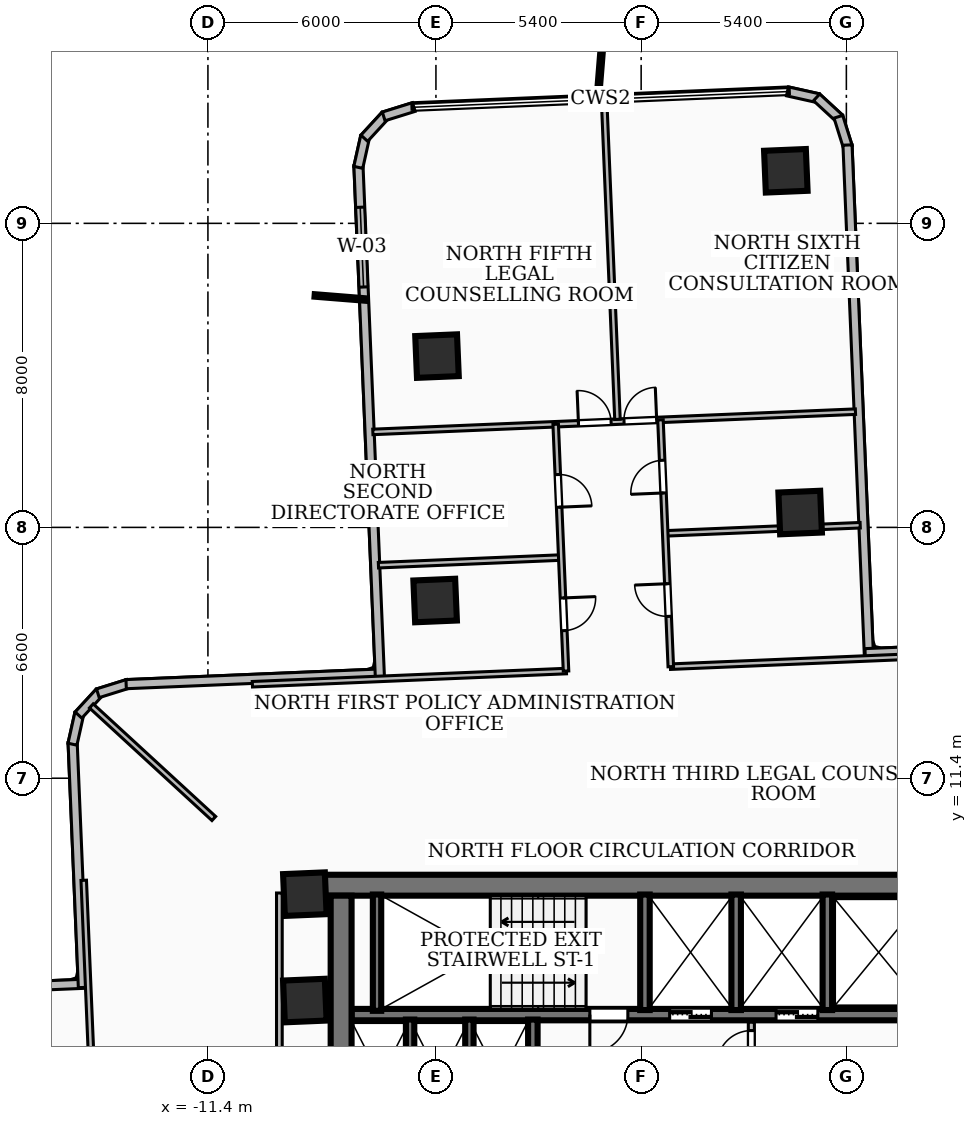
"""IFC4 building model, lengths in metres.
Left out: names, types, materials, properties, quantities, classifications, styles, units other than length and angle.
Written with IfcOpenShell. Run it as: python <this file> out.ifc"""

import sys

from ifc_helpers import new_model, si_unit, direction, frame, frame_2d, origin, origin_2d, place, context, subcontext, project, spatial, rectangle, extrude, element, fill, save


model = new_model("IFC4")
c1 = context("Model", 3, precision=1e-05, world=origin(), true_north=direction((0.0, 1.0)))
c2 = subcontext(c1, "Body", "Model", "MODEL_VIEW")
j1 = project(units=[si_unit("LENGTHUNIT", "METRE"), si_unit("PLANEANGLEUNIT", "RADIAN")], contexts=[c1])
p1 = place(None, origin())
s1 = spatial("IfcSite", under=j1, at=p1, CompositionType="ELEMENT")
p2 = place(p1, origin())
s2 = spatial("IfcBuilding", under=s1, at=p2, CompositionType="ELEMENT")
p3 = place(p2, frame((0.0, 0.0, 46.08)))
s3 = spatial("IfcBuildingStorey", under=s2, at=p3, CompositionType="ELEMENT", Elevation=46.08)
p4 = place(p3, frame((-8.78, 8.585, 0.0), z_axis=(0.0, 0.0, 1.0), x_axis=(1.0, 0.0, 0.0)))
e1 = element("IfcWall", 1, at=p4, inside=s3, PredefinedType="SHEAR", context=c2, shape_type="SweptSolid", body=[
    extrude(rectangle(XDim=17.56, YDim=0.55, at=frame_2d((8.78, 0.0))), origin(), (0.0, 0.0, 1.0), 3.32),
])
p5 = place(p3, frame((-7.895, 2.025, 0.0), z_axis=(0.0, 0.0, 1.0), x_axis=(0.0, 1.0, 0.0)))
e2 = element("IfcWall", 2, at=p5, inside=s3, PredefinedType="SHEAR", context=c2, shape_type="SweptSolid", body=[
    extrude(rectangle(XDim=6.285, YDim=0.55, at=frame_2d((3.143, 0.0))), origin(), (0.0, 0.0, 1.0), 3.32),
])
p6 = place(p3, frame((7.62, 5.18, 0.0), z_axis=(0.0, 0.0, 1.0), x_axis=(-1.0, 0.0, 0.0)))
e3 = element("IfcWall", 3, at=p6, inside=s3, PredefinedType="SOLIDWALL", context=c2, shape_type="SweptSolid", body=[
    extrude(rectangle(XDim=15.24, YDim=0.3, at=frame_2d((7.62, 0.0))), origin(), (0.0, 0.0, 1.0), 3.32),
])
p7 = place(p6, frame((5.77, 0.0, 0.0)))
e4 = element("IfcOpeningElement", 4, at=p7, cuts=e3, PredefinedType="OPENING", context=c2, shape_type="SweptSolid", body=[
    extrude(rectangle(XDim=1.1, YDim=2.15, at=frame_2d((0.55, 1.075))), frame((0.0, 0.16, 0.0), z_axis=(0.0, -1.0, 0.0), x_axis=(1.0, 0.0, 0.0)), (0.0, 0.0, 1.0), 0.32),
])
p8 = place(p6, frame((2.97, 0.0, 0.0)))
e5 = element("IfcOpeningElement", 5, at=p8, cuts=e3, PredefinedType="OPENING", context=c2, shape_type="SweptSolid", body=[
    extrude(rectangle(XDim=1.1, YDim=2.15, at=frame_2d((0.55, 1.075))), frame((0.0, 0.16, 0.0), z_axis=(0.0, -1.0, 0.0), x_axis=(1.0, 0.0, 0.0)), (0.0, 0.0, 1.0), 0.32),
])
p9 = place(p6, frame((7.97, 0.0, 0.0)))
e6 = element("IfcOpeningElement", 6, at=p9, cuts=e3, PredefinedType="OPENING", context=c2, shape_type="SweptSolid", body=[
    extrude(rectangle(XDim=1.0, YDim=2.1, at=frame_2d((0.5, 1.05))), frame((0.0, 0.16, 0.0), z_axis=(0.0, -1.0, 0.0), x_axis=(1.0, 0.0, 0.0)), (0.0, 0.0, 1.0), 0.32),
])
p10 = place(p3, frame((-6.95, 5.28, 0.0), z_axis=(0.0, 0.0, 1.0), x_axis=(0.0, 1.0, 0.0)))
e7 = element("IfcWall", 7, at=p10, inside=s3, PredefinedType="SOLIDWALL", context=c2, shape_type="SweptSolid", body=[
    extrude(rectangle(XDim=3.06, YDim=0.22, at=frame_2d((1.53, 0.0))), origin(), (0.0, 0.0, 1.0), 3.32),
])
for number, where, z_axis, x_axis in (
    (8, (0.1, 5.3, 0.0), (0.0, 0.0, 1.0), (0.0, 1.0, 0.0)),
    (9, (2.5, 5.3, 0.0), (0.0, 0.0, 1.0), (0.0, 1.0, 0.0)),
    (10, (4.9, 5.3, 0.0), (0.0, 0.0, 1.0), (0.0, 1.0, 0.0)),
):
    element("IfcWall", number, at=place(p3, frame(where, z_axis=z_axis, x_axis=x_axis)), inside=s3, PredefinedType="SOLIDWALL", context=c2, shape_type="SweptSolid", body=[
        extrude(rectangle(XDim=3.04, YDim=0.25, at=frame_2d((1.52, 0.0))), origin(), (0.0, 0.0, 1.0), 3.32),
    ])
p11 = place(p3, frame((-2.85, 1.98, 0.0), z_axis=(0.0, 0.0, 1.0), x_axis=(0.0, 1.0, 0.0)))
e11 = element("IfcWall", 11, at=p11, inside=s3, PredefinedType="SOLIDWALL", context=c2, shape_type="SweptSolid", body=[
    extrude(rectangle(XDim=3.07, YDim=0.25, at=frame_2d((1.535, 0.0))), origin(), (0.0, 0.0, 1.0), 3.32),
])
for number, where, z_axis, x_axis in (
    (12, (-6.08, 1.98, 0.0), (0.0, 0.0, 1.0), (0.0, 1.0, 0.0)),
    (13, (-4.52, 1.98, 0.0), (0.0, 0.0, 1.0), (0.0, 1.0, 0.0)),
):
    element("IfcWall", number, at=place(p3, frame(where, z_axis=z_axis, x_axis=x_axis)), inside=s3, PredefinedType="SOLIDWALL", context=c2, shape_type="SweptSolid", body=[
        extrude(rectangle(XDim=3.07, YDim=0.22, at=frame_2d((1.535, 0.0))), origin(), (0.0, 0.0, 1.0), 3.32),
    ])
for number, where, z_axis, x_axis in (
    (14, (-8.85, 5.55, 0.0), (0.0, 0.0, 1.0), (0.999, 0.042, 0.0)),
    (15, (-8.85, 8.35, 0.0), (0.0, 0.0, 1.0), (0.999, 0.042, 0.0)),
    (16, (4.184, 18.391, 0.0), (0.0, 0.0, 1.0), (0.999, 0.042, 0.0)),
    (17, (-5.421, 16.076, 0.0), (0.0, 0.0, 1.0), (0.999, 0.042, 0.0)),
    (18, (3.807, 27.383, 0.0), (0.0, 0.0, 1.0), (0.999, 0.042, 0.0)),
    (19, (-5.372, 22.507, 0.0), (0.0, 0.0, 1.0), (0.999, 0.042, 0.0)),
):
    element("IfcColumn", number, at=place(p3, frame(where, z_axis=z_axis, x_axis=x_axis)), inside=s3, PredefinedType="COLUMN", context=c2, shape_type="SweptSolid", body=[
        extrude(rectangle(XDim=1.1, YDim=1.1, at=origin_2d()), origin(), (0.0, 0.0, 1.0), 3.6),
    ])
p12 = place(p3, frame((-31.458, 5.287, 0.0), z_axis=(0.0, 0.0, 1.0), x_axis=(0.999122484842, 0.041883890494, 0.0)))
e20 = element("IfcWall", 20, at=p12, inside=s3, PredefinedType="SOLIDWALL", context=c2, shape_type="SweptSolid", body=[
    extrude(rectangle(XDim=16.875, YDim=0.24, at=frame_2d((8.438, 0.0))), origin(), (0.0, 0.0, 1.0), 3.32),
])
p13 = place(p12, frame((1.1, 0.0, 0.85)))
e21 = element("IfcOpeningElement", 21, at=p13, cuts=e20, PredefinedType="OPENING", context=c2, shape_type="SweptSolid", body=[
    extrude(rectangle(XDim=2.1, YDim=1.8, at=frame_2d((1.05, 0.9))), frame((0.0, 0.13, 0.0), z_axis=(0.0, -1.0, 0.0), x_axis=(1.0, 0.0, 0.0)), (0.0, 0.0, 1.0), 0.26),
])
p14 = place(p3, frame((-14.69, 5.894, 0.0), z_axis=(0.0, 0.0, 1.0), x_axis=(-0.041827173477, 0.999124860845, 0.0)))
e22 = element("IfcWall", 22, at=p14, inside=s3, PredefinedType="SOLIDWALL", context=c2, shape_type="SweptSolid", body=[
    extrude(rectangle(XDim=6.456, YDim=0.24, at=frame_2d((3.228, 0.0))), origin(), (0.0, 0.0, 1.0), 3.32),
])
p15 = place(p3, frame((-14.964, 12.295, 0.0), z_axis=(0.0, 0.0, 1.0), x_axis=(0.21736704137, 0.976089939158, 0.0)))
e23 = element("IfcWall", 23, at=p15, inside=s3, PredefinedType="SOLIDWALL", context=c2, shape_type="SweptSolid", body=[
    extrude(rectangle(XDim=0.829, YDim=0.24, at=frame_2d((0.415, 0.0))), origin(), (0.0, 0.0, 1.0), 3.32),
])
p16 = place(p3, frame((-14.806, 13.062, 0.0), z_axis=(0.0, 0.0, 1.0), x_axis=(0.677693750404, 0.735344259965, 0.0)))
e24 = element("IfcWall", 24, at=p16, inside=s3, PredefinedType="SOLIDWALL", context=c2, shape_type="SweptSolid", body=[
    extrude(rectangle(XDim=0.813, YDim=0.24, at=frame_2d((0.406, 0.0))), origin(), (0.0, 0.0, 1.0), 3.32),
])
p17 = place(p3, frame((-14.296, 13.635, 0.0), z_axis=(0.0, 0.0, 1.0), x_axis=(0.954396284631, 0.298542680168, 0.0)))
e25 = element("IfcWall", 25, at=p17, inside=s3, PredefinedType="SOLIDWALL", context=c2, shape_type="SweptSolid", body=[
    extrude(rectangle(XDim=0.831, YDim=0.24, at=frame_2d((0.416, 0.0))), origin(), (0.0, 0.0, 1.0), 3.32),
])
p18 = place(p3, frame((-13.552, 13.875, 0.0), z_axis=(0.0, 0.0, 1.0), x_axis=(0.999127443157, 0.041765444226, 0.0)))
e26 = element("IfcWall", 26, at=p18, inside=s3, PredefinedType="SOLIDWALL", context=c2, shape_type="SweptSolid", body=[
    extrude(rectangle(XDim=6.775, YDim=0.24, at=frame_2d((3.387, 0.0))), origin(), (0.0, 0.0, 1.0), 3.32),
])
p19 = place(p3, frame((-6.875, 14.058, 0.0), z_axis=(0.0, 0.0, 1.0), x_axis=(-0.041850586852, 0.999123880397, 0.0)))
e27 = element("IfcWall", 27, at=p19, inside=s3, PredefinedType="SOLIDWALL", context=c2, shape_type="SweptSolid", body=[
    extrude(rectangle(XDim=13.476, YDim=0.24, at=frame_2d((6.738, 0.0))), origin(), (0.0, 0.0, 1.0), 3.32),
])
p20 = place(p19, frame((10.276, 0.0, 0.85)))
e28 = element("IfcOpeningElement", 28, at=p20, cuts=e27, PredefinedType="OPENING", context=c2, shape_type="SweptSolid", body=[
    extrude(rectangle(XDim=2.1, YDim=2.0, at=frame_2d((1.05, 1.0))), frame((0.0, 0.13, 0.0), z_axis=(0.0, -1.0, 0.0), x_axis=(1.0, 0.0, 0.0)), (0.0, 0.0, 1.0), 0.26),
])
p21 = place(p3, frame((-7.443, 27.473, 0.0), z_axis=(0.0, 0.0, 1.0), x_axis=(0.21736704137, 0.976089939158, 0.0)))
e29 = element("IfcWall", 29, at=p21, inside=s3, PredefinedType="SOLIDWALL", context=c2, shape_type="SweptSolid", body=[
    extrude(rectangle(XDim=0.829, YDim=0.24, at=frame_2d((0.415, 0.0))), origin(), (0.0, 0.0, 1.0), 3.32),
])
p22 = place(p3, frame((-7.285, 28.24, 0.0), z_axis=(0.0, 0.0, 1.0), x_axis=(0.676946063044, 0.73603262681, 0.0)))
e30 = element("IfcWall", 30, at=p22, inside=s3, PredefinedType="SOLIDWALL", context=c2, shape_type="SweptSolid", body=[
    extrude(rectangle(XDim=0.814, YDim=0.24, at=frame_2d((0.407, 0.0))), origin(), (0.0, 0.0, 1.0), 3.32),
])
p23 = place(p3, frame((-6.775, 28.814, 0.0), z_axis=(0.0, 0.0, 1.0), x_axis=(0.954730695464, 0.297471509794, 0.0)))
e31 = element("IfcWall", 31, at=p23, inside=s3, PredefinedType="SOLIDWALL", context=c2, shape_type="SweptSolid", body=[
    extrude(rectangle(XDim=0.831, YDim=0.24, at=frame_2d((0.415, 0.0))), origin(), (0.0, 0.0, 1.0), 3.32),
])
p24 = place(p3, frame((3.85, 29.473, 0.0), z_axis=(0.0, 0.0, 1.0), x_axis=(0.976138507006, -0.217148831773, 0.0)))
e32 = element("IfcWall", 32, at=p24, inside=s3, PredefinedType="SOLIDWALL", context=c2, shape_type="SweptSolid", body=[
    extrude(rectangle(XDim=0.829, YDim=0.24, at=frame_2d((0.414, 0.0))), origin(), (0.0, 0.0, 1.0), 3.32),
])
p25 = place(p3, frame((4.617, 29.315, 0.0), z_axis=(0.0, 0.0, 1.0), x_axis=(0.735482115769, -0.677544136853, 0.0)))
e33 = element("IfcWall", 33, at=p25, inside=s3, PredefinedType="SOLIDWALL", context=c2, shape_type="SweptSolid", body=[
    extrude(rectangle(XDim=0.813, YDim=0.24, at=frame_2d((0.407, 0.0))), origin(), (0.0, 0.0, 1.0), 3.32),
])
p26 = place(p3, frame((5.19, 28.805, 0.0), z_axis=(0.0, 0.0, 1.0), x_axis=(0.298542680168, -0.954396284631, 0.0)))
e34 = element("IfcWall", 34, at=p26, inside=s3, PredefinedType="SOLIDWALL", context=c2, shape_type="SweptSolid", body=[
    extrude(rectangle(XDim=0.831, YDim=0.24, at=frame_2d((0.416, 0.0))), origin(), (0.0, 0.0, 1.0), 3.32),
])
p27 = place(p3, frame((5.43, 28.061, 0.0), z_axis=(0.0, 0.0, 1.0), x_axis=(0.041852859621, -0.999123785195, 0.0)))
e35 = element("IfcWall", 35, at=p27, inside=s3, PredefinedType="SOLIDWALL", context=c2, shape_type="SweptSolid", body=[
    extrude(rectangle(XDim=13.475, YDim=0.24, at=frame_2d((6.737, 0.0))), origin(), (0.0, 0.0, 1.0), 2.401),
])
p28 = place(p3, frame((5.894, 14.69, 0.0), z_axis=(0.0, 0.0, 1.0), x_axis=(0.999124860845, 0.041827173477, 0.0)))
e36 = element("IfcWall", 36, at=p28, inside=s3, PredefinedType="SOLIDWALL", context=c2, shape_type="SweptSolid", body=[
    extrude(rectangle(XDim=6.456, YDim=0.24, at=frame_2d((3.228, 0.0))), origin(), (0.0, 0.0, 1.0), 2.401),
])
p29 = place(p3, frame((2.9, 2.04, 0.0), z_axis=(0.0, 0.0, 1.0), x_axis=(0.0, 1.0, 0.0)))
e37 = element("IfcWall", 37, at=p29, inside=s3, PredefinedType="PARTITIONING", context=c2, shape_type="SweptSolid", body=[
    extrude(rectangle(XDim=2.94, YDim=0.16, at=frame_2d((1.47, 0.0))), origin(), (0.0, 0.0, 1.0), 2.385),
])
p30 = place(p29, frame((1.82, 0.0, 0.0)))
e38 = element("IfcOpeningElement", 38, at=p30, cuts=e37, PredefinedType="OPENING", context=c2, shape_type="SweptSolid", body=[
    extrude(rectangle(XDim=0.9, YDim=2.06, at=frame_2d((0.45, 1.03))), frame((0.0, 0.09, 0.0), z_axis=(0.0, -1.0, 0.0), x_axis=(1.0, 0.0, 0.0)), (0.0, 0.0, 1.0), 0.18),
])
p31 = place(p3, frame((-9.52, 1.75, 0.0), z_axis=(0.0, 0.0, 1.0), x_axis=(0.0, 1.0, 0.0)))
e39 = element("IfcWall", 39, at=p31, inside=s3, PredefinedType="PARTITIONING", context=c2, shape_type="SweptSolid", body=[
    extrude(rectangle(XDim=6.63, YDim=0.15, at=frame_2d((3.315, 0.0))), origin(), (0.0, 0.0, 1.0), 2.401),
])
p32 = place(p3, frame((-11.245, 10.34, 0.0), z_axis=(0.0, 0.0, 1.0), x_axis=(-0.736178820698, 0.676787074312, 0.0)))
e40 = element("IfcWall", 40, at=p32, inside=s3, PredefinedType="PARTITIONING", context=c2, shape_type="SweptSolid", body=[
    extrude(rectangle(XDim=4.378, YDim=0.145, at=frame_2d((2.189, 0.0))), origin(), (0.0, 0.0, 1.0), 3.32),
])
p33 = place(p3, frame((-1.967, 14.22, 0.0), z_axis=(0.0, 0.0, 1.0), x_axis=(-0.99911977153, -0.041948565382, 0.0)))
e41 = element("IfcWall", 41, at=p33, inside=s3, PredefinedType="PARTITIONING", context=c2, shape_type="SweptSolid", body=[
    extrude(rectangle(XDim=8.27, YDim=0.145, at=frame_2d((4.135, 0.0))), origin(), (0.0, 0.0, 1.0), 2.401),
])
p34 = place(p3, frame((8.714, 14.668, 0.0), z_axis=(0.0, 0.0, 1.0), x_axis=(-0.999122557945, -0.041882146625, 0.0)))
e42 = element("IfcWall", 42, at=p34, inside=s3, PredefinedType="PARTITIONING", context=c2, shape_type="SweptSolid", body=[
    extrude(rectangle(XDim=7.951, YDim=0.145, at=frame_2d((3.976, 0.0))), origin(), (0.0, 0.0, 1.0), 2.401),
])
p35 = place(p3, frame((-2.122, 17.206, 0.0), z_axis=(0.0, 0.0, 1.0), x_axis=(-0.999119609111, -0.041952433648, 0.0)))
e43 = element("IfcWall", 43, at=p35, inside=s3, PredefinedType="PARTITIONING", context=c2, shape_type="SweptSolid", body=[
    extrude(rectangle(XDim=4.795, YDim=0.145, at=frame_2d((2.397, 0.0))), origin(), (0.0, 0.0, 1.0), 2.401),
])
p36 = place(p3, frame((5.764, 18.057, 0.0), z_axis=(0.0, 0.0, 1.0), x_axis=(-0.999125612634, -0.041809211649, 0.0)))
e44 = element("IfcWall", 44, at=p36, inside=s3, PredefinedType="PARTITIONING", context=c2, shape_type="SweptSolid", body=[
    extrude(rectangle(XDim=5.115, YDim=0.145, at=frame_2d((2.558, 0.0))), origin(), (0.0, 0.0, 1.0), 2.401),
])
p37 = place(p3, frame((-2.249, 20.714, 0.0), z_axis=(0.0, 0.0, 1.0), x_axis=(0.041843020894, -0.999124197286, 0.0)))
e45 = element("IfcWall", 45, at=p37, inside=s3, PredefinedType="PARTITIONING", context=c2, shape_type="SweptSolid", body=[
    extrude(rectangle(XDim=6.5, YDim=0.145, at=frame_2d((3.25, 0.0))), origin(), (0.0, 0.0, 1.0), 3.32),
])
p38 = place(p37, frame((4.575, 0.0, 0.0)))
e46 = element("IfcOpeningElement", 46, at=p38, cuts=e45, PredefinedType="OPENING", context=c2, shape_type="SweptSolid", body=[
    extrude(rectangle(XDim=0.86, YDim=2.04, at=frame_2d((0.43, 1.02))), frame((0.0, 0.083, 0.0), z_axis=(0.0, -1.0, 0.0), x_axis=(1.0, 0.0, 0.0)), (0.0, 0.0, 1.0), 0.165),
])
p39 = place(p37, frame((1.325, 0.0, 0.0)))
e47 = element("IfcOpeningElement", 47, at=p39, cuts=e45, PredefinedType="OPENING", context=c2, shape_type="SweptSolid", body=[
    extrude(rectangle(XDim=0.86, YDim=2.04, at=frame_2d((0.43, 1.02))), frame((0.0, 0.083, 0.0), z_axis=(0.0, -1.0, 0.0), x_axis=(1.0, 0.0, 0.0)), (0.0, 0.0, 1.0), 0.165),
])
p40 = place(p3, frame((0.78, 14.335, 0.0), z_axis=(0.0, 0.0, 1.0), x_axis=(-0.041836740669, 0.99912446028, 0.0)))
e48 = element("IfcWall", 48, at=p40, inside=s3, PredefinedType="PARTITIONING", context=c2, shape_type="SweptSolid", body=[
    extrude(rectangle(XDim=6.501, YDim=0.145, at=frame_2d((3.25, 0.0))), origin(), (0.0, 0.0, 1.0), 3.32),
])
p41 = place(p40, frame((1.325, 0.0, 0.0)))
e49 = element("IfcOpeningElement", 49, at=p41, cuts=e48, PredefinedType="OPENING", context=c2, shape_type="SweptSolid", body=[
    extrude(rectangle(XDim=0.86, YDim=2.04, at=frame_2d((0.43, 1.02))), frame((0.0, 0.083, 0.0), z_axis=(0.0, -1.0, 0.0), x_axis=(1.0, 0.0, 0.0)), (0.0, 0.0, 1.0), 0.165),
])
p42 = place(p40, frame((4.575, 0.0, 0.0)))
e50 = element("IfcOpeningElement", 50, at=p42, cuts=e48, PredefinedType="OPENING", context=c2, shape_type="SweptSolid", body=[
    extrude(rectangle(XDim=0.86, YDim=2.04, at=frame_2d((0.43, 1.02))), frame((0.0, 0.083, 0.0), z_axis=(0.0, -1.0, 0.0), x_axis=(1.0, 0.0, 0.0)), (0.0, 0.0, 1.0), 0.165),
])
p43 = place(p3, frame((-0.623, 20.842, 0.0), z_axis=(0.0, 0.0, 1.0), x_axis=(-0.041805771438, 0.999125756586, 0.0)))
e51 = element("IfcWall", 51, at=p43, inside=s3, PredefinedType="PARTITIONING", context=c2, shape_type="SweptSolid", body=[
    extrude(rectangle(XDim=8.345, YDim=0.145, at=frame_2d((4.173, 0.0))), origin(), (0.0, 0.0, 1.0), 2.812),
])
p44 = place(p3, frame((-7.06, 20.512, 0.0), z_axis=(0.0, 0.0, 1.0), x_axis=(0.99912047737, 0.041931750497, 0.0)))
e52 = element("IfcWall", 52, at=p44, inside=s3, PredefinedType="PARTITIONING", context=c2, shape_type="SweptSolid", body=[
    extrude(rectangle(XDim=12.71, YDim=0.145, at=frame_2d((6.355, 0.0))), origin(), (0.0, 0.0, 1.0), 2.401),
])
p45 = place(p44, frame((6.615, 0.0, 0.0)))
e53 = element("IfcOpeningElement", 53, at=p45, cuts=e52, PredefinedType="OPENING", context=c2, shape_type="SweptSolid", body=[
    extrude(rectangle(XDim=0.86, YDim=2.04, at=frame_2d((0.43, 1.02))), frame((0.0, 0.083, 0.0), z_axis=(0.0, -1.0, 0.0), x_axis=(1.0, 0.0, 0.0)), (0.0, 0.0, 1.0), 0.165),
])
p46 = place(p44, frame((5.415, 0.0, 0.0)))
e54 = element("IfcOpeningElement", 54, at=p46, cuts=e52, PredefinedType="OPENING", context=c2, shape_type="SweptSolid", body=[
    extrude(rectangle(XDim=0.86, YDim=2.04, at=frame_2d((0.43, 1.02))), frame((0.0, 0.083, 0.0), z_axis=(0.0, -1.0, 0.0), x_axis=(1.0, 0.0, 0.0)), (0.0, 0.0, 1.0), 0.165),
])
p47 = place(p3, frame((-14.668, 8.714, 0.0), z_axis=(0.0, 0.0, 1.0), x_axis=(0.041882146625, -0.999122557945, 0.0)))
e55 = element("IfcWall", 55, at=p47, inside=s3, PredefinedType="PARTITIONING", context=c2, shape_type="SweptSolid", body=[
    extrude(rectangle(XDim=7.951, YDim=0.145, at=frame_2d((3.976, 0.0))), origin(), (0.0, 0.0, 1.0), 2.401),
])
p48 = place(p20, origin())
e56 = element("IfcWindow", 56, at=p48, inside=s3, PartitioningType="SINGLE_PANEL", PredefinedType="WINDOW", context=c2, shape_type="SweptSolid", body=[
    extrude(rectangle(XDim=2.1, YDim=2.0, at=frame_2d((1.05, 1.0))), frame((0.0, 0.03, 0.0), z_axis=(0.0, -1.0, 0.0), x_axis=(1.0, 0.0, 0.0)), (0.0, 0.0, 1.0), 0.06),
])
fill(e28, e56)
p49 = place(p7, origin())
e57 = element("IfcDoor", 57, at=p49, inside=s3, OperationType="DOUBLE_DOOR_SLIDING", PredefinedType="DOOR", context=c2, shape_type="SweptSolid", body=[
    extrude(rectangle(XDim=1.1, YDim=2.15, at=frame_2d((0.55, 1.075))), frame((0.0, 0.025, 0.0), z_axis=(0.0, -1.0, 0.0), x_axis=(1.0, 0.0, 0.0)), (0.0, 0.0, 1.0), 0.05),
])
fill(e4, e57)
p50 = place(p8, origin())
e58 = element("IfcDoor", 58, at=p50, inside=s3, OperationType="DOUBLE_DOOR_SLIDING", PredefinedType="DOOR", context=c2, shape_type="SweptSolid", body=[
    extrude(rectangle(XDim=1.1, YDim=2.15, at=frame_2d((0.55, 1.075))), frame((0.0, 0.025, 0.0), z_axis=(0.0, -1.0, 0.0), x_axis=(1.0, 0.0, 0.0)), (0.0, 0.0, 1.0), 0.05),
])
fill(e5, e58)
p51 = place(p9, origin())
e59 = element("IfcDoor", 59, at=p51, inside=s3, OperationType="SINGLE_SWING_RIGHT", PredefinedType="DOOR", context=c2, shape_type="SweptSolid", body=[
    extrude(rectangle(XDim=1.0, YDim=2.1, at=frame_2d((0.5, 1.05))), frame((0.0, 0.025, 0.0), z_axis=(0.0, -1.0, 0.0), x_axis=(1.0, 0.0, 0.0)), (0.0, 0.0, 1.0), 0.05),
])
fill(e6, e59)
p52 = place(p30, origin())
e60 = element("IfcDoor", 60, at=p52, inside=s3, OperationType="SINGLE_SWING_LEFT", PredefinedType="DOOR", context=c2, shape_type="SweptSolid", body=[
    extrude(rectangle(XDim=0.9, YDim=2.06, at=frame_2d((0.45, 1.03))), frame((0.0, 0.025, 0.0), z_axis=(0.0, -1.0, 0.0), x_axis=(1.0, 0.0, 0.0)), (0.0, 0.0, 1.0), 0.05),
])
fill(e38, e60)
p53 = place(p38, origin())
e61 = element("IfcDoor", 61, at=p53, inside=s3, OperationType="SINGLE_SWING_LEFT", PredefinedType="DOOR", context=c2, shape_type="SweptSolid", body=[
    extrude(rectangle(XDim=0.86, YDim=2.04, at=frame_2d((0.43, 1.02))), frame((0.0, 0.025, 0.0), z_axis=(0.0, -1.0, 0.0), x_axis=(1.0, 0.0, 0.0)), (0.0, 0.0, 1.0), 0.05),
])
fill(e46, e61)
p54 = place(p39, origin())
e62 = element("IfcDoor", 62, at=p54, inside=s3, OperationType="SINGLE_SWING_RIGHT", PredefinedType="DOOR", context=c2, shape_type="SweptSolid", body=[
    extrude(rectangle(XDim=0.86, YDim=2.04, at=frame_2d((0.43, 1.02))), frame((0.0, 0.025, 0.0), z_axis=(0.0, -1.0, 0.0), x_axis=(1.0, 0.0, 0.0)), (0.0, 0.0, 1.0), 0.05),
])
fill(e47, e62)
p55 = place(p41, origin())
e63 = element("IfcDoor", 63, at=p55, inside=s3, OperationType="SINGLE_SWING_RIGHT", PredefinedType="DOOR", context=c2, shape_type="SweptSolid", body=[
    extrude(rectangle(XDim=0.86, YDim=2.04, at=frame_2d((0.43, 1.02))), frame((0.0, 0.025, 0.0), z_axis=(0.0, -1.0, 0.0), x_axis=(1.0, 0.0, 0.0)), (0.0, 0.0, 1.0), 0.05),
])
fill(e49, e63)
p56 = place(p42, origin())
e64 = element("IfcDoor", 64, at=p56, inside=s3, OperationType="SINGLE_SWING_LEFT", PredefinedType="DOOR", context=c2, shape_type="SweptSolid", body=[
    extrude(rectangle(XDim=0.86, YDim=2.04, at=frame_2d((0.43, 1.02))), frame((0.0, 0.025, 0.0), z_axis=(0.0, -1.0, 0.0), x_axis=(1.0, 0.0, 0.0)), (0.0, 0.0, 1.0), 0.05),
])
fill(e50, e64)
p57 = place(p45, origin())
e65 = element("IfcDoor", 65, at=p57, inside=s3, OperationType="SINGLE_SWING_RIGHT", PredefinedType="DOOR", context=c2, shape_type="SweptSolid", body=[
    extrude(rectangle(XDim=0.86, YDim=2.04, at=frame_2d((0.43, 1.02))), frame((0.0, 0.025, 0.0), z_axis=(0.0, -1.0, 0.0), x_axis=(1.0, 0.0, 0.0)), (0.0, 0.0, 1.0), 0.05),
])
fill(e53, e65)
p58 = place(p46, origin())
e66 = element("IfcDoor", 66, at=p58, inside=s3, OperationType="SINGLE_SWING_LEFT", PredefinedType="DOOR", context=c2, shape_type="SweptSolid", body=[
    extrude(rectangle(XDim=0.86, YDim=2.04, at=frame_2d((0.43, 1.02))), frame((0.0, 0.025, 0.0), z_axis=(0.0, -1.0, 0.0), x_axis=(1.0, 0.0, 0.0)), (0.0, 0.0, 1.0), 0.05),
])
fill(e54, e66)
save(model, sys.argv[1])
